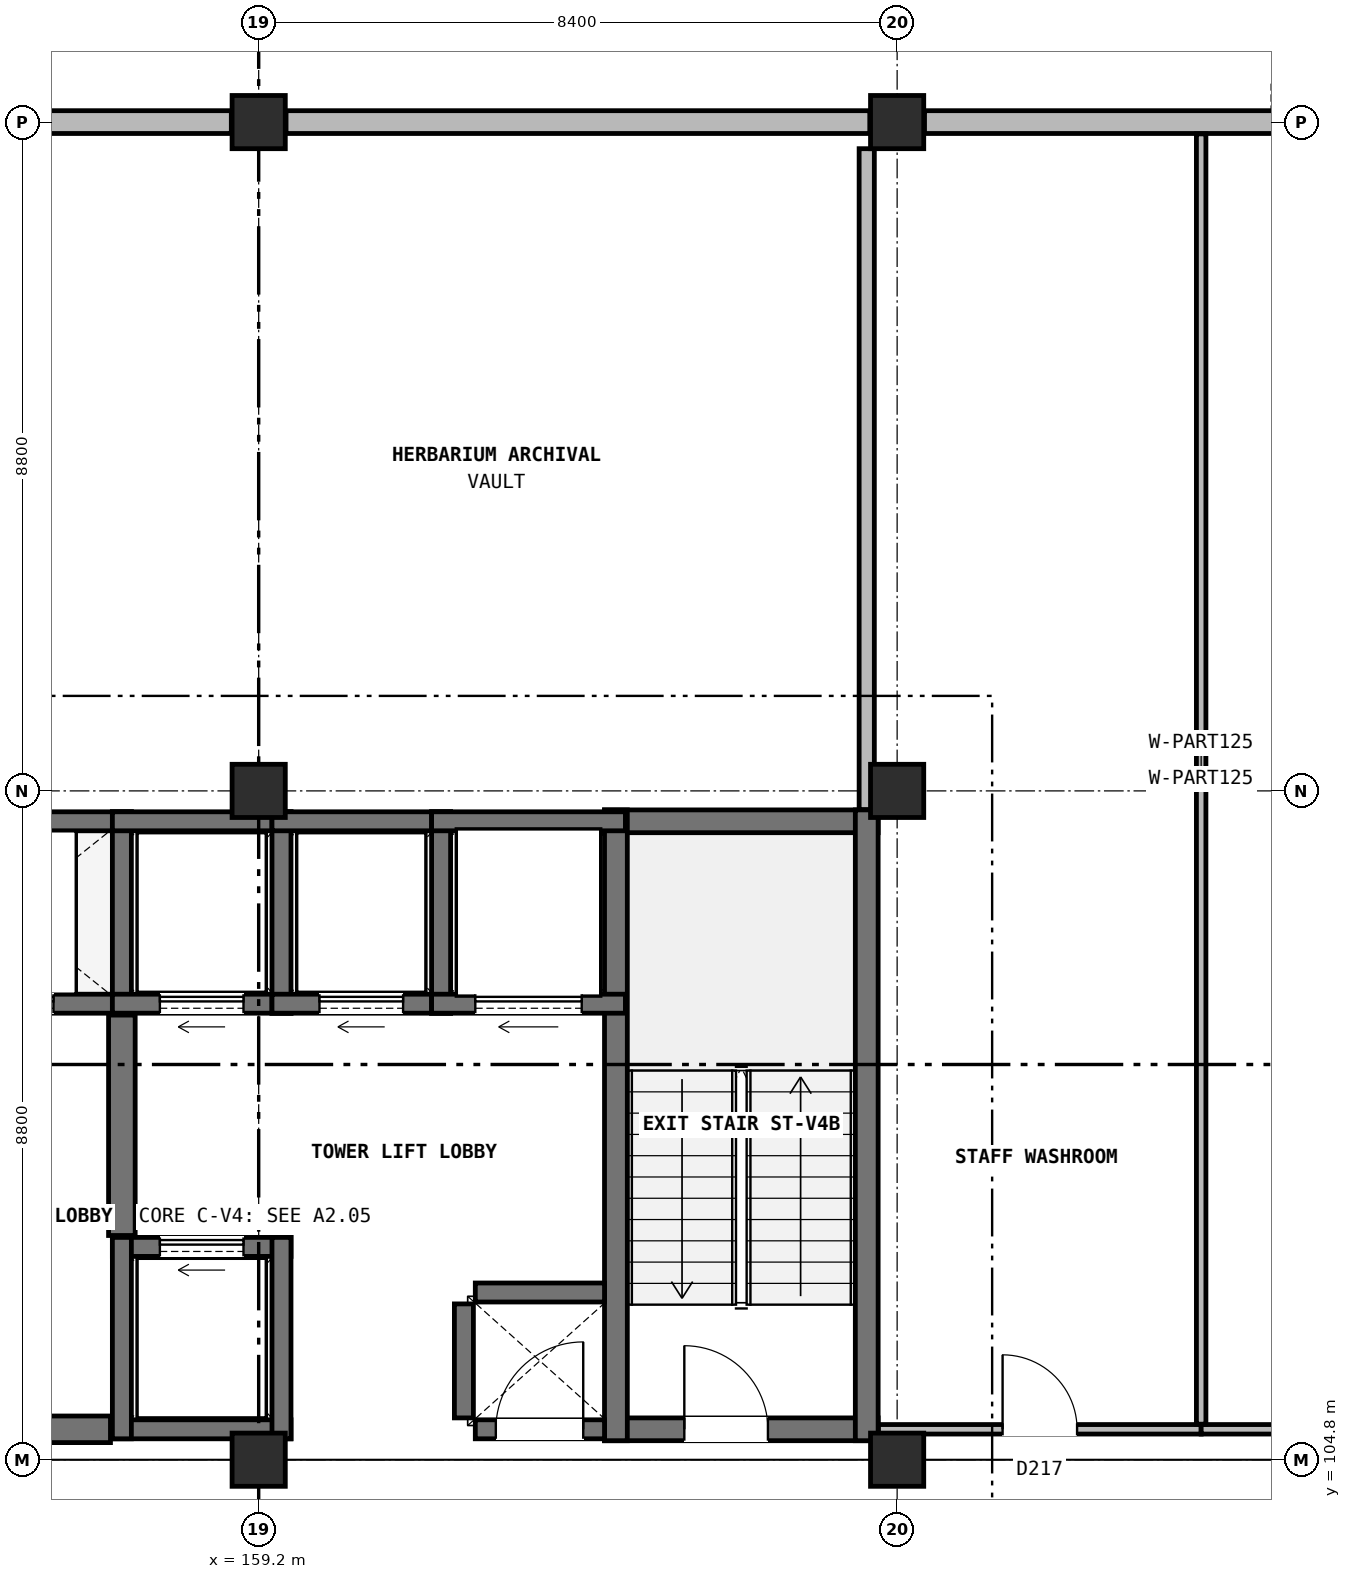
"""IFC4 building model, lengths in metres.
Left out: names, types, materials, properties, quantities, classifications, styles, units other than length and angle.
Written with IfcOpenShell. Run it as: python <this file> out.ifc"""

import sys

from ifc_helpers import new_model, si_unit, direction, frame, frame_2d, origin, origin_2d, place, context, subcontext, project, spatial, rectangle, extrude, element, fill, save


model = new_model("IFC4")
c1 = context("Model", 3, precision=1e-05, world=origin(), true_north=direction((0.0, 1.0)))
c2 = subcontext(c1, "Body", "Model", "MODEL_VIEW")
j1 = project(units=[si_unit("LENGTHUNIT", "METRE"), si_unit("PLANEANGLEUNIT", "RADIAN")], contexts=[c1])
p1 = place(None, origin())
s1 = spatial("IfcSite", under=j1, at=p1, CompositionType="ELEMENT")
p2 = place(p1, origin())
s2 = spatial("IfcBuilding", under=s1, at=p2, CompositionType="ELEMENT")
p3 = place(p2, frame((0.0, 0.0, 24.8)))
s3 = spatial("IfcBuildingStorey", under=s2, at=p3, CompositionType="ELEMENT", Elevation=24.8)
for number, where, z_axis, x_axis in (
    (1, (159.2, 104.8, 0.0), (0.0, 0.0, 1.0), (1.0, 0.0, 0.0)),
    (2, (159.2, 113.6, 0.0), (0.0, 0.0, 1.0), (1.0, 0.0, 0.0)),
    (3, (159.2, 122.4, 0.0), (0.0, 0.0, 1.0), (1.0, 0.0, 0.0)),
    (4, (167.6, 104.8, 0.0), (0.0, 0.0, 1.0), (1.0, 0.0, 0.0)),
    (5, (167.6, 113.6, 0.0), (0.0, 0.0, 1.0), (1.0, 0.0, 0.0)),
    (6, (167.6, 122.4, 0.0), (0.0, 0.0, 1.0), (1.0, 0.0, 0.0)),
):
    element("IfcColumn", number, at=place(p3, frame(where, z_axis=z_axis, x_axis=x_axis)), inside=s3, PredefinedType="COLUMN", context=c2, shape_type="SweptSolid", body=[
        extrude(rectangle(XDim=0.7, YDim=0.7, at=origin_2d()), origin(), (0.0, 0.0, 1.0), 4.0),
    ])
p4 = place(p3, frame((175.64, 122.4, 0.0), z_axis=(0.0, 0.0, 1.0), x_axis=(-1.0, 0.0, 0.0)))
e7 = element("IfcWall", 7, at=p4, inside=s3, PredefinedType="SOLIDWALL", context=c2, shape_type="SweptSolid", body=[
    extrude(rectangle(XDim=7.68, YDim=0.3, at=frame_2d((3.84, 0.0))), origin(), (0.0, 0.0, 1.0), 3.15),
])
p5 = place(p4, frame((1.36, 0.0, 0.9)))
e8 = element("IfcOpeningElement", 8, at=p5, cuts=e7, PredefinedType="OPENING", context=c2, shape_type="SweptSolid", body=[
    extrude(rectangle(XDim=1.32, YDim=1.78, at=frame_2d((0.66, 0.89))), frame((0.0, 0.16, 0.0), z_axis=(0.0, -1.0, 0.0), x_axis=(1.0, 0.0, 0.0)), (0.0, 0.0, 1.0), 0.32),
])
p6 = place(p3, frame((167.24, 122.4, 0.0), z_axis=(0.0, 0.0, 1.0), x_axis=(-1.0, 0.0, 0.0)))
e9 = element("IfcWall", 9, at=p6, inside=s3, PredefinedType="SOLIDWALL", context=c2, shape_type="SweptSolid", body=[
    extrude(rectangle(XDim=7.68, YDim=0.3, at=frame_2d((3.84, 0.0))), origin(), (0.0, 0.0, 1.0), 3.15),
])
p7 = place(p3, frame((158.84, 122.4, 0.0), z_axis=(0.0, 0.0, 1.0), x_axis=(-1.0, 0.0, 0.0)))
e10 = element("IfcWall", 10, at=p7, inside=s3, PredefinedType="SOLIDWALL", context=c2, shape_type="SweptSolid", body=[
    extrude(rectangle(XDim=7.68, YDim=0.3, at=frame_2d((3.84, 0.0))), origin(), (0.0, 0.0, 1.0), 3.15),
])
p8 = place(p3, frame((163.75, 105.2, 0.0), z_axis=(0.0, 0.0, 1.0), x_axis=(1.0, 0.0, 0.0)))
e11 = element("IfcWall", 11, at=p8, inside=s3, PredefinedType="SHEAR", context=c2, shape_type="SweptSolid", body=[
    extrude(rectangle(XDim=3.6, YDim=0.3, at=frame_2d((1.8, 0.0))), origin(), (0.0, 0.0, 1.0), 4.0),
])
p9 = place(p8, frame((1.05, 0.0, 0.0)))
e12 = element("IfcOpeningElement", 12, at=p9, cuts=e11, PredefinedType="OPENING", context=c2, shape_type="SweptSolid", body=[
    extrude(rectangle(XDim=1.1, YDim=2.2, at=frame_2d((0.55, 1.1))), frame((0.0, 0.16, 0.0), z_axis=(0.0, -1.0, 0.0), x_axis=(1.0, 0.0, 0.0)), (0.0, 0.0, 1.0), 0.32),
])
p10 = place(p3, frame((163.75, 113.2, 0.0), z_axis=(0.0, 0.0, 1.0), x_axis=(1.0, 0.0, 0.0)))
e13 = element("IfcWall", 13, at=p10, inside=s3, PredefinedType="SHEAR", context=c2, shape_type="SweptSolid", body=[
    extrude(rectangle(XDim=3.6, YDim=0.3, at=frame_2d((1.8, 0.0))), origin(), (0.0, 0.0, 1.0), 4.0),
])
for number, where, z_axis, x_axis in (
    (14, (163.9, 105.05, 0.0), (0.0, 0.0, 1.0), (0.0, 1.0, 0.0)),
    (15, (167.2, 105.05, 0.0), (0.0, 0.0, 1.0), (0.0, 1.0, 0.0)),
):
    element("IfcWall", number, at=place(p3, frame(where, z_axis=z_axis, x_axis=x_axis)), inside=s3, PredefinedType="SHEAR", context=c2, shape_type="SweptSolid", body=[
        extrude(rectangle(XDim=8.3, YDim=0.3, at=frame_2d((4.15, 0.0))), origin(), (0.0, 0.0, 1.0), 4.0),
    ])
p11 = place(p3, frame((154.275, 110.8, 0.0), z_axis=(0.0, 0.0, 1.0), x_axis=(1.0, 0.0, 0.0)))
e16 = element("IfcWall", 16, at=p11, inside=s3, PredefinedType="SOLIDWALL", context=c2, shape_type="SweptSolid", body=[
    extrude(rectangle(XDim=3.25, YDim=0.25, at=frame_2d((1.625, 0.0))), origin(), (0.0, 0.0, 1.0), 3.68),
])
p12 = place(p11, frame((1.025, 0.0, 0.0)))
e17 = element("IfcOpeningElement", 17, at=p12, cuts=e16, PredefinedType="OPENING", context=c2, shape_type="SweptSolid", body=[
    extrude(rectangle(XDim=1.2, YDim=2.2, at=frame_2d((0.6, 1.1))), frame((0.0, 0.135, 0.0), z_axis=(0.0, -1.0, 0.0), x_axis=(1.0, 0.0, 0.0)), (0.0, 0.0, 1.0), 0.27),
])
p13 = place(p3, frame((154.275, 113.2, 0.0), z_axis=(0.0, 0.0, 1.0), x_axis=(1.0, 0.0, 0.0)))
e18 = element("IfcWall", 18, at=p13, inside=s3, PredefinedType="SOLIDWALL", context=c2, shape_type="SweptSolid", body=[
    extrude(rectangle(XDim=3.25, YDim=0.25, at=frame_2d((1.625, 0.0))), origin(), (0.0, 0.0, 1.0), 3.68),
])
p14 = place(p3, frame((157.4, 110.675, 0.0), z_axis=(0.0, 0.0, 1.0), x_axis=(0.0, 1.0, 0.0)))
e19 = element("IfcWall", 19, at=p14, inside=s3, PredefinedType="SOLIDWALL", context=c2, shape_type="SweptSolid", body=[
    extrude(rectangle(XDim=2.65, YDim=0.25, at=frame_2d((1.325, 0.0))), origin(), (0.0, 0.0, 1.0), 3.68),
])
p15 = place(p3, frame((157.275, 110.8, 0.0), z_axis=(0.0, 0.0, 1.0), x_axis=(1.0, 0.0, 0.0)))
e20 = element("IfcWall", 20, at=p15, inside=s3, PredefinedType="SOLIDWALL", context=c2, shape_type="SweptSolid", body=[
    extrude(rectangle(XDim=2.35, YDim=0.25, at=frame_2d((1.175, 0.0))), origin(), (0.0, 0.0, 1.0), 3.68),
])
p16 = place(p15, frame((0.625, 0.0, 0.0)))
e21 = element("IfcOpeningElement", 21, at=p16, cuts=e20, PredefinedType="OPENING", context=c2, shape_type="SweptSolid", body=[
    extrude(rectangle(XDim=1.1, YDim=2.2, at=frame_2d((0.55, 1.1))), frame((0.0, 0.135, 0.0), z_axis=(0.0, -1.0, 0.0), x_axis=(1.0, 0.0, 0.0)), (0.0, 0.0, 1.0), 0.27),
])
p17 = place(p3, frame((157.275, 113.2, 0.0), z_axis=(0.0, 0.0, 1.0), x_axis=(1.0, 0.0, 0.0)))
e22 = element("IfcWall", 22, at=p17, inside=s3, PredefinedType="SOLIDWALL", context=c2, shape_type="SweptSolid", body=[
    extrude(rectangle(XDim=2.35, YDim=0.25, at=frame_2d((1.175, 0.0))), origin(), (0.0, 0.0, 1.0), 3.68),
])
p18 = place(p3, frame((159.5, 110.675, 0.0), z_axis=(0.0, 0.0, 1.0), x_axis=(0.0, 1.0, 0.0)))
e23 = element("IfcWall", 23, at=p18, inside=s3, PredefinedType="SOLIDWALL", context=c2, shape_type="SweptSolid", body=[
    extrude(rectangle(XDim=2.65, YDim=0.25, at=frame_2d((1.325, 0.0))), origin(), (0.0, 0.0, 1.0), 3.68),
])
p19 = place(p3, frame((159.375, 110.8, 0.0), z_axis=(0.0, 0.0, 1.0), x_axis=(1.0, 0.0, 0.0)))
e24 = element("IfcWall", 24, at=p19, inside=s3, PredefinedType="SOLIDWALL", context=c2, shape_type="SweptSolid", body=[
    extrude(rectangle(XDim=2.35, YDim=0.25, at=frame_2d((1.175, 0.0))), origin(), (0.0, 0.0, 1.0), 3.68),
])
p20 = place(p19, frame((0.625, 0.0, 0.0)))
e25 = element("IfcOpeningElement", 25, at=p20, cuts=e24, PredefinedType="OPENING", context=c2, shape_type="SweptSolid", body=[
    extrude(rectangle(XDim=1.1, YDim=2.2, at=frame_2d((0.55, 1.1))), frame((0.0, 0.135, 0.0), z_axis=(0.0, -1.0, 0.0), x_axis=(1.0, 0.0, 0.0)), (0.0, 0.0, 1.0), 0.27),
])
p21 = place(p3, frame((159.375, 113.2, 0.0), z_axis=(0.0, 0.0, 1.0), x_axis=(1.0, 0.0, 0.0)))
e26 = element("IfcWall", 26, at=p21, inside=s3, PredefinedType="SOLIDWALL", context=c2, shape_type="SweptSolid", body=[
    extrude(rectangle(XDim=2.35, YDim=0.25, at=frame_2d((1.175, 0.0))), origin(), (0.0, 0.0, 1.0), 3.68),
])
p22 = place(p3, frame((161.6, 110.675, 0.0), z_axis=(0.0, 0.0, 1.0), x_axis=(0.0, 1.0, 0.0)))
e27 = element("IfcWall", 27, at=p22, inside=s3, PredefinedType="SOLIDWALL", context=c2, shape_type="SweptSolid", body=[
    extrude(rectangle(XDim=2.65, YDim=0.25, at=frame_2d((1.325, 0.0))), origin(), (0.0, 0.0, 1.0), 3.68),
])
p23 = place(p3, frame((157.275, 105.2, 0.0), z_axis=(0.0, 0.0, 1.0), x_axis=(1.0, 0.0, 0.0)))
e28 = element("IfcWall", 28, at=p23, inside=s3, PredefinedType="SOLIDWALL", context=c2, shape_type="SweptSolid", body=[
    extrude(rectangle(XDim=2.35, YDim=0.25, at=frame_2d((1.175, 0.0))), origin(), (0.0, 0.0, 1.0), 3.68),
])
p24 = place(p3, frame((157.275, 107.6, 0.0), z_axis=(0.0, 0.0, 1.0), x_axis=(1.0, 0.0, 0.0)))
e29 = element("IfcWall", 29, at=p24, inside=s3, PredefinedType="SOLIDWALL", context=c2, shape_type="SweptSolid", body=[
    extrude(rectangle(XDim=2.35, YDim=0.25, at=frame_2d((1.175, 0.0))), origin(), (0.0, 0.0, 1.0), 3.68),
])
p25 = place(p24, frame((0.625, 0.0, 0.0)))
e30 = element("IfcOpeningElement", 30, at=p25, cuts=e29, PredefinedType="OPENING", context=c2, shape_type="SweptSolid", body=[
    extrude(rectangle(XDim=1.1, YDim=2.2, at=frame_2d((0.55, 1.1))), frame((0.0, 0.135, 0.0), z_axis=(0.0, -1.0, 0.0), x_axis=(1.0, 0.0, 0.0)), (0.0, 0.0, 1.0), 0.27),
])
for number, where, z_axis, x_axis in (
    (31, (157.4, 105.075, 0.0), (0.0, 0.0, 1.0), (0.0, 1.0, 0.0)),
    (32, (159.5, 105.075, 0.0), (0.0, 0.0, 1.0), (0.0, 1.0, 0.0)),
):
    element("IfcWall", number, at=place(p3, frame(where, z_axis=z_axis, x_axis=x_axis)), inside=s3, PredefinedType="SOLIDWALL", context=c2, shape_type="SweptSolid", body=[
        extrude(rectangle(XDim=2.65, YDim=0.25, at=frame_2d((1.325, 0.0))), origin(), (0.0, 0.0, 1.0), 3.68),
    ])
p26 = place(p3, frame((161.475, 110.8, 0.0), z_axis=(0.0, 0.0, 1.0), x_axis=(1.0, 0.0, 0.0)))
e33 = element("IfcWall", 33, at=p26, inside=s3, PredefinedType="SOLIDWALL", context=c2, shape_type="SweptSolid", body=[
    extrude(rectangle(XDim=2.55, YDim=0.25, at=frame_2d((1.275, 0.0))), origin(), (0.0, 0.0, 1.0), 3.68),
])
p27 = place(p26, frame((0.575, 0.0, 0.0)))
e34 = element("IfcOpeningElement", 34, at=p27, cuts=e33, PredefinedType="OPENING", context=c2, shape_type="SweptSolid", body=[
    extrude(rectangle(XDim=1.4, YDim=2.3, at=frame_2d((0.7, 1.15))), frame((0.0, 0.135, 0.0), z_axis=(0.0, -1.0, 0.0), x_axis=(1.0, 0.0, 0.0)), (0.0, 0.0, 1.0), 0.27),
])
p28 = place(p3, frame((161.475, 113.2, 0.0), z_axis=(0.0, 0.0, 1.0), x_axis=(1.0, 0.0, 0.0)))
e35 = element("IfcWall", 35, at=p28, inside=s3, PredefinedType="SOLIDWALL", context=c2, shape_type="SweptSolid", body=[
    extrude(rectangle(XDim=2.55, YDim=0.25, at=frame_2d((1.275, 0.0))), origin(), (0.0, 0.0, 1.0), 3.68),
])
p29 = place(p3, frame((157.4, 107.75, 0.0), z_axis=(0.0, 0.0, 1.0), x_axis=(0.0, 1.0, 0.0)))
e36 = element("IfcWall", 36, at=p29, inside=s3, PredefinedType="SHEAR", context=c2, shape_type="SweptSolid", body=[
    extrude(rectangle(XDim=2.9, YDim=0.35, at=frame_2d((1.45, 0.0))), origin(), (0.0, 0.0, 1.0), 3.68),
])
p30 = place(p3, frame((154.55, 105.2, 0.0), z_axis=(0.0, 0.0, 1.0), x_axis=(1.0, 0.0, 0.0)))
e37 = element("IfcWall", 37, at=p30, inside=s3, PredefinedType="SHEAR", context=c2, shape_type="SweptSolid", body=[
    extrude(rectangle(XDim=2.7, YDim=0.35, at=frame_2d((1.35, 0.0))), origin(), (0.0, 0.0, 1.0), 3.68),
])
p31 = place(p30, frame((0.8, 0.0, 0.0)))
e38 = element("IfcOpeningElement", 38, at=p31, cuts=e37, PredefinedType="OPENING", context=c2, shape_type="SweptSolid", body=[
    extrude(rectangle(XDim=1.1, YDim=2.2, at=frame_2d((0.55, 1.1))), frame((0.0, 0.185, 0.0), z_axis=(0.0, -1.0, 0.0), x_axis=(1.0, 0.0, 0.0)), (0.0, 0.0, 1.0), 0.37),
])
p32 = place(p3, frame((161.9, 105.35, 0.0), z_axis=(0.0, 0.0, 1.0), x_axis=(0.0, 1.0, 0.0)))
e39 = element("IfcWall", 39, at=p32, inside=s3, PredefinedType="SOLIDWALL", context=c2, shape_type="SweptSolid", body=[
    extrude(rectangle(XDim=1.5, YDim=0.25, at=frame_2d((0.75, 0.0))), origin(), (0.0, 0.0, 1.0), 3.68),
])
p33 = place(p3, frame((162.05, 107.0, 0.0), z_axis=(0.0, 0.0, 1.0), x_axis=(1.0, 0.0, 0.0)))
e40 = element("IfcWall", 40, at=p33, inside=s3, PredefinedType="SOLIDWALL", context=c2, shape_type="SweptSolid", body=[
    extrude(rectangle(XDim=1.7, YDim=0.25, at=frame_2d((0.85, 0.0))), origin(), (0.0, 0.0, 1.0), 3.68),
])
p34 = place(p3, frame((162.05, 105.2, 0.0), z_axis=(0.0, 0.0, 1.0), x_axis=(1.0, 0.0, 0.0)))
e41 = element("IfcWall", 41, at=p34, inside=s3, PredefinedType="SOLIDWALL", context=c2, shape_type="SweptSolid", body=[
    extrude(rectangle(XDim=1.7, YDim=0.25, at=frame_2d((0.85, 0.0))), origin(), (0.0, 0.0, 1.0), 3.68),
])
p35 = place(p34, frame((0.27, 0.0, 0.0)))
e42 = element("IfcOpeningElement", 42, at=p35, cuts=e41, PredefinedType="OPENING", context=c2, shape_type="SweptSolid", body=[
    extrude(rectangle(XDim=1.15, YDim=2.2, at=frame_2d((0.575, 1.1))), frame((0.0, 0.135, 0.0), z_axis=(0.0, -1.0, 0.0), x_axis=(1.0, 0.0, 0.0)), (0.0, 0.0, 1.0), 0.27),
])
p36 = place(p3, frame((167.355, 105.2, 0.0), z_axis=(0.0, 0.0, 1.0), x_axis=(1.0, 0.0, 0.0)))
e43 = element("IfcWall", 43, at=p36, inside=s3, PredefinedType="PARTITIONING", context=c2, shape_type="SweptSolid", body=[
    extrude(rectangle(XDim=4.245, YDim=0.125, at=frame_2d((2.123, 0.0))), origin(), (0.0, 0.0, 1.0), 3.145),
])
p37 = place(p36, frame((1.633, 0.0, 0.0)))
e44 = element("IfcOpeningElement", 44, at=p37, cuts=e43, PredefinedType="OPENING", context=c2, shape_type="SweptSolid", body=[
    extrude(rectangle(XDim=0.98, YDim=2.1, at=frame_2d((0.49, 1.05))), frame((0.0, 0.073, 0.0), z_axis=(0.0, -1.0, 0.0), x_axis=(1.0, 0.0, 0.0)), (0.0, 0.0, 1.0), 0.145),
])
p38 = place(p3, frame((171.6, 105.2, 0.0), z_axis=(0.0, 0.0, 1.0), x_axis=(1.0, 0.0, 0.0)))
e45 = element("IfcWall", 45, at=p38, inside=s3, PredefinedType="PARTITIONING", context=c2, shape_type="SweptSolid", body=[
    extrude(rectangle(XDim=4.05, YDim=0.125, at=frame_2d((2.025, 0.0))), origin(), (0.0, 0.0, 1.0), 3.145),
])
p39 = place(p38, frame((1.535, 0.0, 0.0)))
e46 = element("IfcOpeningElement", 46, at=p39, cuts=e45, PredefinedType="OPENING", context=c2, shape_type="SweptSolid", body=[
    extrude(rectangle(XDim=0.98, YDim=2.1, at=frame_2d((0.49, 1.05))), frame((0.0, 0.073, 0.0), z_axis=(0.0, -1.0, 0.0), x_axis=(1.0, 0.0, 0.0)), (0.0, 0.0, 1.0), 0.145),
])
p40 = place(p3, frame((167.2, 113.355, 0.0), z_axis=(0.0, 0.0, 1.0), x_axis=(0.0, 1.0, 0.0)))
e47 = element("IfcWall", 47, at=p40, inside=s3, PredefinedType="PARTITIONING", context=c2, shape_type="SweptSolid", body=[
    extrude(rectangle(XDim=8.695, YDim=0.2, at=frame_2d((4.348, 0.0))), origin(), (0.0, 0.0, 1.0), 3.145),
])
p41 = place(p3, frame((171.6, 105.268, 0.0), z_axis=(0.0, 0.0, 1.0), x_axis=(0.0, 1.0, 0.0)))
e48 = element("IfcWall", 48, at=p41, inside=s3, PredefinedType="PARTITIONING", context=c2, shape_type="SweptSolid", body=[
    extrude(rectangle(XDim=16.978, YDim=0.125, at=frame_2d((8.489, 0.0))), origin(), (0.0, 0.0, 1.0), 3.665),
])
p42 = place(p9, origin())
e49 = element("IfcDoor", 49, at=p42, inside=s3, OperationType="SINGLE_SWING_LEFT", PredefinedType="DOOR", context=c2, shape_type="SweptSolid", body=[
    extrude(rectangle(XDim=1.1, YDim=2.2, at=frame_2d((0.55, 1.1))), frame((0.0, 0.025, 0.0), z_axis=(0.0, -1.0, 0.0), x_axis=(1.0, 0.0, 0.0)), (0.0, 0.0, 1.0), 0.05),
])
fill(e12, e49)
p43 = place(p12, origin())
e50 = element("IfcDoor", 50, at=p43, inside=s3, OperationType="SLIDING_TO_LEFT", PredefinedType="DOOR", context=c2, shape_type="SweptSolid", body=[
    extrude(rectangle(XDim=1.2, YDim=2.2, at=frame_2d((0.6, 1.1))), frame((0.0, 0.025, 0.0), z_axis=(0.0, -1.0, 0.0), x_axis=(1.0, 0.0, 0.0)), (0.0, 0.0, 1.0), 0.05),
])
fill(e17, e50)
p44 = place(p16, origin())
e51 = element("IfcDoor", 51, at=p44, inside=s3, OperationType="SLIDING_TO_LEFT", PredefinedType="DOOR", context=c2, shape_type="SweptSolid", body=[
    extrude(rectangle(XDim=1.1, YDim=2.2, at=frame_2d((0.55, 1.1))), frame((0.0, 0.025, 0.0), z_axis=(0.0, -1.0, 0.0), x_axis=(1.0, 0.0, 0.0)), (0.0, 0.0, 1.0), 0.05),
])
fill(e21, e51)
p45 = place(p20, origin())
e52 = element("IfcDoor", 52, at=p45, inside=s3, OperationType="SLIDING_TO_LEFT", PredefinedType="DOOR", context=c2, shape_type="SweptSolid", body=[
    extrude(rectangle(XDim=1.1, YDim=2.2, at=frame_2d((0.55, 1.1))), frame((0.0, 0.025, 0.0), z_axis=(0.0, -1.0, 0.0), x_axis=(1.0, 0.0, 0.0)), (0.0, 0.0, 1.0), 0.05),
])
fill(e25, e52)
p46 = place(p25, origin())
e53 = element("IfcDoor", 53, at=p46, inside=s3, OperationType="SLIDING_TO_LEFT", PredefinedType="DOOR", context=c2, shape_type="SweptSolid", body=[
    extrude(rectangle(XDim=1.1, YDim=2.2, at=frame_2d((0.55, 1.1))), frame((0.0, 0.025, 0.0), z_axis=(0.0, -1.0, 0.0), x_axis=(1.0, 0.0, 0.0)), (0.0, 0.0, 1.0), 0.05),
])
fill(e30, e53)
p47 = place(p27, origin())
e54 = element("IfcDoor", 54, at=p47, inside=s3, OperationType="SLIDING_TO_LEFT", PredefinedType="DOOR", context=c2, shape_type="SweptSolid", body=[
    extrude(rectangle(XDim=1.4, YDim=2.3, at=frame_2d((0.7, 1.15))), frame((0.0, 0.025, 0.0), z_axis=(0.0, -1.0, 0.0), x_axis=(1.0, 0.0, 0.0)), (0.0, 0.0, 1.0), 0.05),
])
fill(e34, e54)
p48 = place(p35, origin())
e55 = element("IfcDoor", 55, at=p48, inside=s3, OperationType="SINGLE_SWING_RIGHT", PredefinedType="DOOR", context=c2, shape_type="SweptSolid", body=[
    extrude(rectangle(XDim=1.15, YDim=2.2, at=frame_2d((0.575, 1.1))), frame((0.0, 0.025, 0.0), z_axis=(0.0, -1.0, 0.0), x_axis=(1.0, 0.0, 0.0)), (0.0, 0.0, 1.0), 0.05),
])
fill(e42, e55)
p49 = place(p37, origin())
e56 = element("IfcDoor", 56, at=p49, inside=s3, OperationType="SINGLE_SWING_LEFT", PredefinedType="DOOR", context=c2, shape_type="SweptSolid", body=[
    extrude(rectangle(XDim=0.98, YDim=2.1, at=frame_2d((0.49, 1.05))), frame((0.0, 0.025, 0.0), z_axis=(0.0, -1.0, 0.0), x_axis=(1.0, 0.0, 0.0)), (0.0, 0.0, 1.0), 0.05),
])
fill(e44, e56)
save(model, sys.argv[1])
